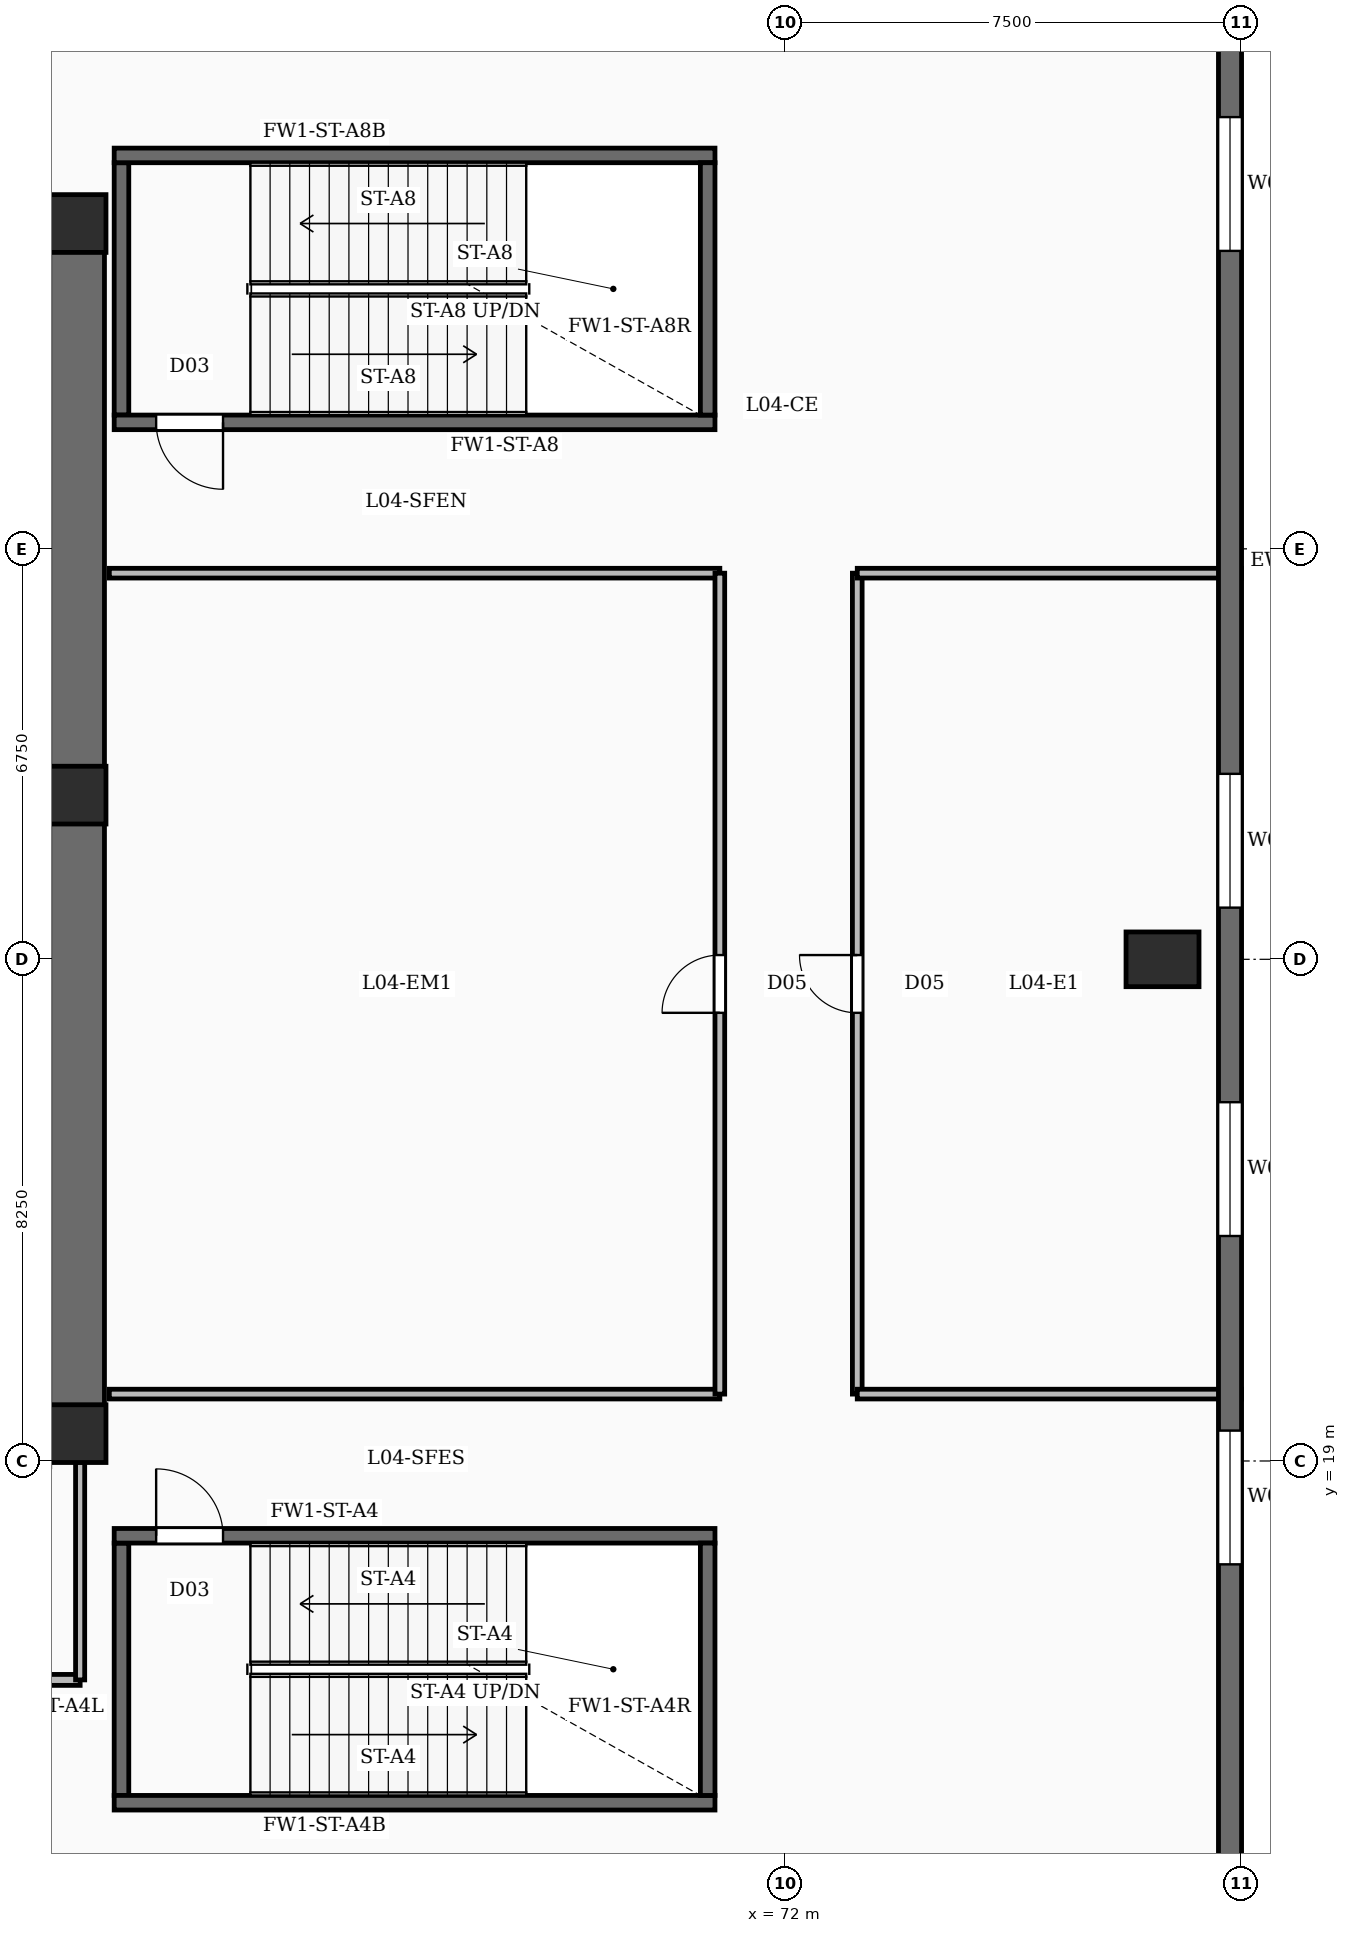
"""IFC4 building model, lengths in metres.
Left out: names, types, materials, properties, quantities, classifications, styles, units other than length and angle.
Written with IfcOpenShell. Run it as: python <this file> out.ifc"""

import sys

from ifc_helpers import new_model, si_unit, direction, frame, frame_2d, origin, origin_2d, place, context, subcontext, project, spatial, rectangle, extrude, element, fill, save


model = new_model("IFC4")
c1 = context("Model", 3, precision=1e-05, world=origin(), true_north=direction((0.0, 1.0)))
c2 = subcontext(c1, "Body", "Model", "MODEL_VIEW")
j1 = project(units=[si_unit("LENGTHUNIT", "METRE"), si_unit("PLANEANGLEUNIT", "RADIAN")], contexts=[c1])
p1 = place(None, origin())
s1 = spatial("IfcSite", under=j1, at=p1, CompositionType="ELEMENT")
p2 = place(p1, origin())
s2 = spatial("IfcBuilding", under=s1, at=p2, CompositionType="ELEMENT")
p3 = place(p2, frame((0.0, 0.0, 23.0)))
s3 = spatial("IfcBuildingStorey", under=s2, at=p3, CompositionType="ELEMENT", Elevation=23.0)
p4 = place(p3, frame((60.35, 19.0, -0.35), z_axis=(0.0, 0.0, 1.0), x_axis=(0.0, 1.0, 0.0)))
e1 = element("IfcWall", 1, at=p4, inside=s3, PredefinedType="SHEAR", context=c2, shape_type="SweptSolid", body=[
    extrude(rectangle(XDim=20.8, YDim=0.9, at=frame_2d((10.4, 0.0))), origin(), (0.0, 0.0, 1.0), 5.0),
])
for number, where, z_axis, x_axis in (
    (2, (60.35, 19.45, -0.35), (0.0, 0.0, 1.0), (1.0, 0.0, 0.0)),
    (3, (60.35, 29.95, -0.35), (0.0, 0.0, 1.0), (1.0, 0.0, 0.0)),
    (4, (60.35, 39.35, -0.35), (0.0, 0.0, 1.0), (1.0, 0.0, 0.0)),
):
    element("IfcColumn", number, at=place(p3, frame(where, z_axis=z_axis, x_axis=x_axis)), inside=s3, PredefinedType="COLUMN", context=c2, shape_type="SweptSolid", body=[
        extrude(rectangle(XDim=0.95, YDim=0.95, at=origin_2d()), origin(), (0.0, 0.0, 1.0), 5.0),
    ])
p5 = place(p3, frame((78.2, 27.25, -0.35), z_axis=(0.0, 0.0, 1.0), x_axis=(1.0, 0.0, 0.0)))
e5 = element("IfcColumn", 5, at=p5, inside=s3, PredefinedType="COLUMN", context=c2, shape_type="SweptSolid", body=[
    extrude(rectangle(XDim=1.2, YDim=0.9, at=origin_2d()), origin(), (0.0, 0.0, 1.0), 5.0),
])
p6 = place(p3, frame((79.31, 49.1, 0.0), z_axis=(0.0, 0.0, 1.0), x_axis=(0.0, -1.0, 0.0)))
e6 = element("IfcWall", 6, at=p6, inside=s3, PredefinedType="SOLIDWALL", context=c2, shape_type="SweptSolid", body=[
    extrude(rectangle(XDim=43.7, YDim=0.38, at=frame_2d((21.85, 0.0))), origin(), (0.0, 0.0, 1.0), 4.65),
])
p7 = place(p6, frame((2.6, 0.0, 0.95)))
e7 = element("IfcOpeningElement", 7, at=p7, cuts=e6, PredefinedType="OPENING", context=c2, shape_type="SweptSolid", body=[
    extrude(rectangle(XDim=2.2, YDim=2.5, at=frame_2d((1.1, 1.25))), frame((0.0, 0.2, 0.0), z_axis=(0.0, -1.0, 0.0), x_axis=(1.0, 0.0, 0.0)), (0.0, 0.0, 1.0), 0.4),
])
p8 = place(p6, frame((8.0, 0.0, 0.95)))
e8 = element("IfcOpeningElement", 8, at=p8, cuts=e6, PredefinedType="OPENING", context=c2, shape_type="SweptSolid", body=[
    extrude(rectangle(XDim=2.2, YDim=2.5, at=frame_2d((1.1, 1.25))), frame((0.0, 0.2, 0.0), z_axis=(0.0, -1.0, 0.0), x_axis=(1.0, 0.0, 0.0)), (0.0, 0.0, 1.0), 0.4),
])
p9 = place(p6, frame((18.8, 0.0, 0.95)))
e9 = element("IfcOpeningElement", 9, at=p9, cuts=e6, PredefinedType="OPENING", context=c2, shape_type="SweptSolid", body=[
    extrude(rectangle(XDim=2.2, YDim=2.5, at=frame_2d((1.1, 1.25))), frame((0.0, 0.2, 0.0), z_axis=(0.0, -1.0, 0.0), x_axis=(1.0, 0.0, 0.0)), (0.0, 0.0, 1.0), 0.4),
])
p10 = place(p6, frame((24.2, 0.0, 0.95)))
e10 = element("IfcOpeningElement", 10, at=p10, cuts=e6, PredefinedType="OPENING", context=c2, shape_type="SweptSolid", body=[
    extrude(rectangle(XDim=2.2, YDim=2.5, at=frame_2d((1.1, 1.25))), frame((0.0, 0.2, 0.0), z_axis=(0.0, -1.0, 0.0), x_axis=(1.0, 0.0, 0.0)), (0.0, 0.0, 1.0), 0.4),
])
p11 = place(p6, frame((29.6, 0.0, 0.95)))
e11 = element("IfcOpeningElement", 11, at=p11, cuts=e6, PredefinedType="OPENING", context=c2, shape_type="SweptSolid", body=[
    extrude(rectangle(XDim=2.2, YDim=2.5, at=frame_2d((1.1, 1.25))), frame((0.0, 0.2, 0.0), z_axis=(0.0, -1.0, 0.0), x_axis=(1.0, 0.0, 0.0)), (0.0, 0.0, 1.0), 0.4),
])
p12 = place(p3, frame((60.96, 17.77, 0.0), z_axis=(0.0, 0.0, 1.0), x_axis=(1.0, 0.0, 0.0)))
e12 = element("IfcWall", 12, at=p12, inside=s3, PredefinedType="SOLIDWALL", context=c2, shape_type="SweptSolid", body=[
    extrude(rectangle(XDim=9.88, YDim=0.24, at=frame_2d((4.94, 0.0))), origin(), (0.0, 0.0, 1.0), 4.65),
])
p13 = place(p12, frame((0.69, 0.0, 0.0)))
e13 = element("IfcOpeningElement", 13, at=p13, cuts=e12, PredefinedType="OPENING", context=c2, shape_type="SweptSolid", body=[
    extrude(rectangle(XDim=1.1, YDim=2.15, at=frame_2d((0.55, 1.075))), frame((0.0, 0.13, 0.0), z_axis=(0.0, -1.0, 0.0), x_axis=(1.0, 0.0, 0.0)), (0.0, 0.0, 1.0), 0.26),
])
p14 = place(p3, frame((60.96, 13.38, 0.0), z_axis=(0.0, 0.0, 1.0), x_axis=(1.0, 0.0, 0.0)))
e14 = element("IfcWall", 14, at=p14, inside=s3, PredefinedType="SOLIDWALL", context=c2, shape_type="SweptSolid", body=[
    extrude(rectangle(XDim=9.88, YDim=0.24, at=frame_2d((4.94, 0.0))), origin(), (0.0, 0.0, 1.0), 4.65),
])
for number, where, z_axis, x_axis in (
    (15, (61.08, 13.5, 0.0), (0.0, 0.0, 1.0), (0.0, 1.0, 0.0)),
    (16, (70.72, 13.5, 0.0), (0.0, 0.0, 1.0), (0.0, 1.0, 0.0)),
):
    element("IfcWall", number, at=place(p3, frame(where, z_axis=z_axis, x_axis=x_axis)), inside=s3, PredefinedType="SOLIDWALL", context=c2, shape_type="SweptSolid", body=[
        extrude(rectangle(XDim=4.15, YDim=0.24, at=frame_2d((2.075, 0.0))), origin(), (0.0, 0.0, 1.0), 4.65),
    ])
p15 = place(p3, frame((70.84, 36.08, 0.0), z_axis=(0.0, 0.0, 1.0), x_axis=(-1.0, 0.0, 0.0)))
e17 = element("IfcWall", 17, at=p15, inside=s3, PredefinedType="SOLIDWALL", context=c2, shape_type="SweptSolid", body=[
    extrude(rectangle(XDim=9.88, YDim=0.24, at=frame_2d((4.94, 0.0))), origin(), (0.0, 0.0, 1.0), 4.65),
])
p16 = place(p15, frame((8.09, 0.0, 0.0)))
e18 = element("IfcOpeningElement", 18, at=p16, cuts=e17, PredefinedType="OPENING", context=c2, shape_type="SweptSolid", body=[
    extrude(rectangle(XDim=1.1, YDim=2.15, at=frame_2d((0.55, 1.075))), frame((0.0, 0.13, 0.0), z_axis=(0.0, -1.0, 0.0), x_axis=(1.0, 0.0, 0.0)), (0.0, 0.0, 1.0), 0.26),
])
p17 = place(p3, frame((60.96, 40.47, 0.0), z_axis=(0.0, 0.0, 1.0), x_axis=(1.0, 0.0, 0.0)))
e19 = element("IfcWall", 19, at=p17, inside=s3, PredefinedType="SOLIDWALL", context=c2, shape_type="SweptSolid", body=[
    extrude(rectangle(XDim=9.88, YDim=0.24, at=frame_2d((4.94, 0.0))), origin(), (0.0, 0.0, 1.0), 4.65),
])
for number, where, z_axis, x_axis in (
    (20, (61.08, 36.2, 0.0), (0.0, 0.0, 1.0), (0.0, 1.0, 0.0)),
    (21, (70.72, 36.2, 0.0), (0.0, 0.0, 1.0), (0.0, 1.0, 0.0)),
):
    element("IfcWall", number, at=place(p3, frame(where, z_axis=z_axis, x_axis=x_axis)), inside=s3, PredefinedType="SOLIDWALL", context=c2, shape_type="SweptSolid", body=[
        extrude(rectangle(XDim=4.15, YDim=0.24, at=frame_2d((2.075, 0.0))), origin(), (0.0, 0.0, 1.0), 4.65),
    ])
p18 = place(p3, frame((50.4, 15.4, 0.0), z_axis=(0.0, 0.0, 1.0), x_axis=(1.0, 0.0, 0.0)))
e22 = element("IfcWall", 22, at=p18, inside=s3, PredefinedType="SOLIDWALL", context=c2, shape_type="SweptSolid", body=[
    extrude(rectangle(XDim=10.0, YDim=0.18, at=frame_2d((5.0, 0.0))), origin(), (0.0, 0.0, 1.0), 3.71),
])
p19 = place(p18, frame((1.94, 0.0, 0.0)))
e23 = element("IfcOpeningElement", 23, at=p19, cuts=e22, PredefinedType="OPENING", context=c2, shape_type="SweptSolid", body=[
    extrude(rectangle(XDim=0.92, YDim=2.1, at=frame_2d((0.46, 1.05))), frame((0.0, 0.1, 0.0), z_axis=(0.0, -1.0, 0.0), x_axis=(1.0, 0.0, 0.0)), (0.0, 0.0, 1.0), 0.2),
])
p20 = place(p18, frame((6.97, 0.0, 0.0)))
e24 = element("IfcOpeningElement", 24, at=p20, cuts=e22, PredefinedType="OPENING", context=c2, shape_type="SweptSolid", body=[
    extrude(rectangle(XDim=0.86, YDim=2.05, at=frame_2d((0.43, 1.025))), frame((0.0, 0.1, 0.0), z_axis=(0.0, -1.0, 0.0), x_axis=(1.0, 0.0, 0.0)), (0.0, 0.0, 1.0), 0.2),
])
p21 = place(p3, frame((60.4, 15.4, 0.0), z_axis=(0.0, 0.0, 1.0), x_axis=(0.0, 1.0, 0.0)))
e25 = element("IfcWall", 25, at=p21, inside=s3, PredefinedType="PARTITIONING", context=c2, shape_type="SweptSolid", body=[
    extrude(rectangle(XDim=3.58, YDim=0.15, at=frame_2d((1.79, 0.0))), origin(), (0.0, 0.0, 1.0), 3.71),
])
p22 = place(p3, frame((70.92, 20.1, 0.0), z_axis=(0.0, 0.0, 1.0), x_axis=(0.0, 1.0, 0.0)))
e26 = element("IfcWall", 26, at=p22, inside=s3, PredefinedType="PARTITIONING", context=c2, shape_type="SweptSolid", body=[
    extrude(rectangle(XDim=13.5, YDim=0.16, at=frame_2d((6.75, 0.0))), origin(), (0.0, 0.0, 1.0), 3.71),
])
p23 = place(p22, frame((6.27, 0.0, 0.0)))
e27 = element("IfcOpeningElement", 27, at=p23, cuts=e26, PredefinedType="OPENING", context=c2, shape_type="SweptSolid", body=[
    extrude(rectangle(XDim=0.95, YDim=2.15, at=frame_2d((0.475, 1.075))), frame((0.0, 0.09, 0.0), z_axis=(0.0, -1.0, 0.0), x_axis=(1.0, 0.0, 0.0)), (0.0, 0.0, 1.0), 0.18),
])
p24 = place(p3, frame((73.18, 20.1, 0.0), z_axis=(0.0, 0.0, 1.0), x_axis=(0.0, 1.0, 0.0)))
e28 = element("IfcWall", 28, at=p24, inside=s3, PredefinedType="PARTITIONING", context=c2, shape_type="SweptSolid", body=[
    extrude(rectangle(XDim=13.5, YDim=0.16, at=frame_2d((6.75, 0.0))), origin(), (0.0, 0.0, 1.0), 3.71),
])
p25 = place(p24, frame((6.27, 0.0, 0.0)))
e29 = element("IfcOpeningElement", 29, at=p25, cuts=e28, PredefinedType="OPENING", context=c2, shape_type="SweptSolid", body=[
    extrude(rectangle(XDim=0.95, YDim=2.15, at=frame_2d((0.475, 1.075))), frame((0.0, 0.09, 0.0), z_axis=(0.0, -1.0, 0.0), x_axis=(1.0, 0.0, 0.0)), (0.0, 0.0, 1.0), 0.18),
])
for number, where, z_axis, x_axis in (
    (30, (60.88, 20.1, 0.0), (0.0, 0.0, 1.0), (1.0, 0.0, 0.0)),
    (31, (60.88, 33.6, 0.0), (0.0, 0.0, 1.0), (1.0, 0.0, 0.0)),
):
    element("IfcWall", number, at=place(p3, frame(where, z_axis=z_axis, x_axis=x_axis)), inside=s3, PredefinedType="PARTITIONING", context=c2, shape_type="SweptSolid", body=[
        extrude(rectangle(XDim=10.04, YDim=0.16, at=frame_2d((5.02, 0.0))), origin(), (0.0, 0.0, 1.0), 3.71),
    ])
for number, where, z_axis, x_axis in (
    (32, (73.18, 20.1, 0.0), (0.0, 0.0, 1.0), (1.0, 0.0, 0.0)),
    (33, (73.18, 33.6, 0.0), (0.0, 0.0, 1.0), (1.0, 0.0, 0.0)),
):
    element("IfcWall", number, at=place(p3, frame(where, z_axis=z_axis, x_axis=x_axis)), inside=s3, PredefinedType="PARTITIONING", context=c2, shape_type="SweptSolid", body=[
        extrude(rectangle(XDim=6.32, YDim=0.16, at=frame_2d((3.16, 0.0))), origin(), (0.0, 0.0, 1.0), 3.71),
    ])
p26 = place(p8, origin())
e34 = element("IfcWindow", 34, at=p26, inside=s3, PartitioningType="DOUBLE_PANEL_VERTICAL", PredefinedType="WINDOW", context=c2, shape_type="SweptSolid", body=[
    extrude(rectangle(XDim=2.2, YDim=2.5, at=frame_2d((1.1, 1.25))), frame((0.0, 0.03, 0.0), z_axis=(0.0, -1.0, 0.0), x_axis=(1.0, 0.0, 0.0)), (0.0, 0.0, 1.0), 0.06),
])
fill(e8, e34)
p27 = place(p9, origin())
e35 = element("IfcWindow", 35, at=p27, inside=s3, PartitioningType="DOUBLE_PANEL_VERTICAL", PredefinedType="WINDOW", context=c2, shape_type="SweptSolid", body=[
    extrude(rectangle(XDim=2.2, YDim=2.5, at=frame_2d((1.1, 1.25))), frame((0.0, 0.03, 0.0), z_axis=(0.0, -1.0, 0.0), x_axis=(1.0, 0.0, 0.0)), (0.0, 0.0, 1.0), 0.06),
])
fill(e9, e35)
p28 = place(p10, origin())
e36 = element("IfcWindow", 36, at=p28, inside=s3, PartitioningType="DOUBLE_PANEL_VERTICAL", PredefinedType="WINDOW", context=c2, shape_type="SweptSolid", body=[
    extrude(rectangle(XDim=2.2, YDim=2.5, at=frame_2d((1.1, 1.25))), frame((0.0, 0.03, 0.0), z_axis=(0.0, -1.0, 0.0), x_axis=(1.0, 0.0, 0.0)), (0.0, 0.0, 1.0), 0.06),
])
fill(e10, e36)
p29 = place(p11, origin())
e37 = element("IfcWindow", 37, at=p29, inside=s3, PartitioningType="DOUBLE_PANEL_VERTICAL", PredefinedType="WINDOW", context=c2, shape_type="SweptSolid", body=[
    extrude(rectangle(XDim=2.2, YDim=2.5, at=frame_2d((1.1, 1.25))), frame((0.0, 0.03, 0.0), z_axis=(0.0, -1.0, 0.0), x_axis=(1.0, 0.0, 0.0)), (0.0, 0.0, 1.0), 0.06),
])
fill(e11, e37)
p30 = place(p13, origin())
e38 = element("IfcDoor", 38, at=p30, inside=s3, OperationType="SINGLE_SWING_LEFT", PredefinedType="DOOR", context=c2, shape_type="SweptSolid", body=[
    extrude(rectangle(XDim=1.1, YDim=2.15, at=frame_2d((0.55, 1.075))), frame((0.0, 0.025, 0.0), z_axis=(0.0, -1.0, 0.0), x_axis=(1.0, 0.0, 0.0)), (0.0, 0.0, 1.0), 0.05),
])
fill(e13, e38)
p31 = place(p16, origin())
e39 = element("IfcDoor", 39, at=p31, inside=s3, OperationType="SINGLE_SWING_LEFT", PredefinedType="DOOR", context=c2, shape_type="SweptSolid", body=[
    extrude(rectangle(XDim=1.1, YDim=2.15, at=frame_2d((0.55, 1.075))), frame((0.0, 0.025, 0.0), z_axis=(0.0, -1.0, 0.0), x_axis=(1.0, 0.0, 0.0)), (0.0, 0.0, 1.0), 0.05),
])
fill(e18, e39)
p32 = place(p23, origin())
e40 = element("IfcDoor", 40, at=p32, inside=s3, OperationType="SINGLE_SWING_LEFT", PredefinedType="DOOR", context=c2, shape_type="SweptSolid", body=[
    extrude(rectangle(XDim=0.95, YDim=2.15, at=frame_2d((0.475, 1.075))), frame((0.0, 0.025, 0.0), z_axis=(0.0, -1.0, 0.0), x_axis=(1.0, 0.0, 0.0)), (0.0, 0.0, 1.0), 0.05),
])
fill(e27, e40)
p33 = place(p25, origin())
e41 = element("IfcDoor", 41, at=p33, inside=s3, OperationType="SINGLE_SWING_RIGHT", PredefinedType="DOOR", context=c2, shape_type="SweptSolid", body=[
    extrude(rectangle(XDim=0.95, YDim=2.15, at=frame_2d((0.475, 1.075))), frame((0.0, 0.025, 0.0), z_axis=(0.0, -1.0, 0.0), x_axis=(1.0, 0.0, 0.0)), (0.0, 0.0, 1.0), 0.05),
])
fill(e29, e41)
save(model, sys.argv[1])
